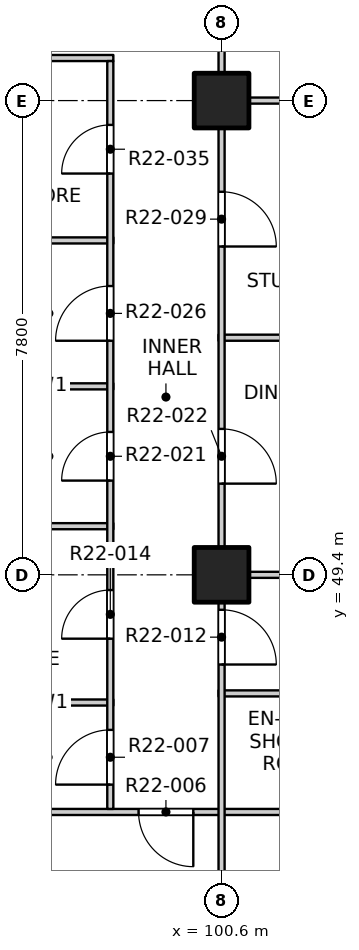
"""IFC4 building model, lengths in metres.
Left out: names, types, materials, properties, quantities, classifications, styles, units other than length and angle.
Written with IfcOpenShell. Run it as: python <this file> out.ifc"""

import sys

from ifc_helpers import new_model, si_unit, direction, frame, frame_2d, origin, origin_2d, place, context, subcontext, project, spatial, rectangle, extrude, element, fill, save


model = new_model("IFC4")
c1 = context("Model", 3, precision=1e-05, world=origin(), true_north=direction((0.0, 1.0)))
c2 = subcontext(c1, "Body", "Model", "MODEL_VIEW")
j1 = project(units=[si_unit("LENGTHUNIT", "METRE"), si_unit("PLANEANGLEUNIT", "RADIAN")], contexts=[c1])
p1 = place(None, origin())
s1 = spatial("IfcSite", under=j1, at=p1, CompositionType="ELEMENT")
p2 = place(p1, origin())
s2 = spatial("IfcBuilding", under=s1, at=p2, CompositionType="ELEMENT")
p3 = place(p2, frame((0.0, 0.0, 231.3)))
s3 = spatial("IfcBuildingStorey", under=s2, at=p3, CompositionType="ELEMENT", Elevation=231.3)
for number, where, z_axis, x_axis in (
    (1, (100.6, 49.4, -0.25), (0.0, 0.0, 1.0), (1.0, 0.0, 0.0)),
    (2, (100.6, 57.2, -0.25), (0.0, 0.0, 1.0), (1.0, 0.0, 0.0)),
):
    element("IfcColumn", number, at=place(p3, frame(where, z_axis=z_axis, x_axis=x_axis)), inside=s3, PredefinedType="COLUMN", context=c2, shape_type="SweptSolid", body=[
        extrude(rectangle(XDim=0.9, YDim=0.9, at=origin_2d()), origin(), (0.0, 0.0, 1.0), 3.4),
    ])
p4 = place(p3, frame((96.625, 45.5, 0.0), z_axis=(0.0, 0.0, 1.0), x_axis=(1.0, 0.0, 0.0)))
e3 = element("IfcWall", 3, at=p4, inside=s3, PredefinedType="PARTITIONING", context=c2, shape_type="SweptSolid", body=[
    extrude(rectangle(XDim=11.475, YDim=0.1, at=frame_2d((5.738, 0.0))), origin(), (0.0, 0.0, 1.0), 3.15),
])
p5 = place(p4, frame((2.61, 0.0, 0.0)))
e4 = element("IfcOpeningElement", 4, at=p5, cuts=e3, PredefinedType="OPENING", context=c2, shape_type="SweptSolid", body=[
    extrude(rectangle(XDim=0.9, YDim=2.1, at=frame_2d((0.45, 1.05))), frame((0.0, 0.06, 0.0), z_axis=(0.0, -1.0, 0.0), x_axis=(1.0, 0.0, 0.0)), (0.0, 0.0, 1.0), 0.12),
])
p6 = place(p3, frame((96.625, 47.3, 0.0), z_axis=(0.0, 0.0, 1.0), x_axis=(1.0, 0.0, 0.0)))
e5 = element("IfcWall", 5, at=p6, inside=s3, PredefinedType="PARTITIONING", context=c2, shape_type="SweptSolid", body=[
    extrude(rectangle(XDim=2.195, YDim=0.1, at=frame_2d((1.098, 0.0))), origin(), (0.0, 0.0, 1.0), 3.15),
])
p7 = place(p3, frame((100.55, 47.45, 0.0), z_axis=(0.0, 0.0, 1.0), x_axis=(1.0, 0.0, 0.0)))
e6 = element("IfcWall", 6, at=p7, inside=s3, PredefinedType="PARTITIONING", context=c2, shape_type="SweptSolid", body=[
    extrude(rectangle(XDim=3.7, YDim=0.1, at=frame_2d((1.85, 0.0))), origin(), (0.0, 0.0, 1.0), 3.15),
])
p8 = place(p3, frame((100.55, 49.4, 0.0), z_axis=(0.0, 0.0, 1.0), x_axis=(1.0, 0.0, 0.0)))
e7 = element("IfcWall", 7, at=p8, inside=s3, PredefinedType="PARTITIONING", context=c2, shape_type="SweptSolid", body=[
    extrude(rectangle(XDim=7.55, YDim=0.1, at=frame_2d((3.775, 0.0))), origin(), (0.0, 0.0, 1.0), 3.15),
])
for number, where, z_axis, x_axis in (
    (8, (96.6, 50.2, 0.0), (0.0, 0.0, 1.0), (1.0, 0.0, 0.0)),
    (9, (96.6, 52.5, 0.0), (0.0, 0.0, 1.0), (1.0, 0.0, 0.0)),
):
    element("IfcWall", number, at=place(p3, frame(where, z_axis=z_axis, x_axis=x_axis)), inside=s3, PredefinedType="PARTITIONING", context=c2, shape_type="SweptSolid", body=[
        extrude(rectangle(XDim=2.22, YDim=0.1, at=frame_2d((1.11, 0.0))), origin(), (0.0, 0.0, 1.0), 3.15),
    ])
p9 = place(p3, frame((100.55, 53.3, 0.0), z_axis=(0.0, 0.0, 1.0), x_axis=(1.0, 0.0, 0.0)))
e10 = element("IfcWall", 10, at=p9, inside=s3, PredefinedType="PARTITIONING", context=c2, shape_type="SweptSolid", body=[
    extrude(rectangle(XDim=7.55, YDim=0.1, at=frame_2d((3.775, 0.0))), origin(), (0.0, 0.0, 1.0), 3.15),
])
p10 = place(p3, frame((96.6, 54.9, 0.0), z_axis=(0.0, 0.0, 1.0), x_axis=(1.0, 0.0, 0.0)))
e11 = element("IfcWall", 11, at=p10, inside=s3, PredefinedType="PARTITIONING", context=c2, shape_type="SweptSolid", body=[
    extrude(rectangle(XDim=2.22, YDim=0.1, at=frame_2d((1.11, 0.0))), origin(), (0.0, 0.0, 1.0), 3.15),
])
p11 = place(p3, frame((100.55, 57.2, 0.0), z_axis=(0.0, 0.0, 1.0), x_axis=(1.0, 0.0, 0.0)))
e12 = element("IfcWall", 12, at=p11, inside=s3, PredefinedType="PARTITIONING", context=c2, shape_type="SweptSolid", body=[
    extrude(rectangle(XDim=7.55, YDim=0.1, at=frame_2d((3.775, 0.0))), origin(), (0.0, 0.0, 1.0), 3.15),
])
p12 = place(p3, frame((96.6, 57.9, 0.0), z_axis=(0.0, 0.0, 1.0), x_axis=(1.0, 0.0, 0.0)))
e13 = element("IfcWall", 13, at=p12, inside=s3, PredefinedType="PARTITIONING", context=c2, shape_type="SweptSolid", body=[
    extrude(rectangle(XDim=2.22, YDim=0.1, at=frame_2d((1.11, 0.0))), origin(), (0.0, 0.0, 1.0), 3.15),
])
p13 = place(p3, frame((98.77, 45.55, 0.0), z_axis=(0.0, 0.0, 1.0), x_axis=(0.0, 1.0, 0.0)))
e14 = element("IfcWall", 14, at=p13, inside=s3, PredefinedType="PARTITIONING", context=c2, shape_type="SweptSolid", body=[
    extrude(rectangle(XDim=12.3, YDim=0.1, at=frame_2d((6.15, 0.0))), origin(), (0.0, 0.0, 1.0), 3.15),
])
p14 = place(p13, frame((0.4, 0.0, 0.0)))
e15 = element("IfcOpeningElement", 15, at=p14, cuts=e14, PredefinedType="OPENING", context=c2, shape_type="SweptSolid", body=[
    extrude(rectangle(XDim=0.9, YDim=2.1, at=frame_2d((0.45, 1.05))), frame((0.0, 0.06, 0.0), z_axis=(0.0, -1.0, 0.0), x_axis=(1.0, 0.0, 0.0)), (0.0, 0.0, 1.0), 0.12),
])
p15 = place(p13, frame((2.8, 0.0, 0.0)))
e16 = element("IfcOpeningElement", 16, at=p15, cuts=e14, PredefinedType="OPENING", context=c2, shape_type="SweptSolid", body=[
    extrude(rectangle(XDim=0.8, YDim=2.1, at=frame_2d((0.4, 1.05))), frame((0.0, 0.06, 0.0), z_axis=(0.0, -1.0, 0.0), x_axis=(1.0, 0.0, 0.0)), (0.0, 0.0, 1.0), 0.12),
])
p16 = place(p13, frame((5.4, 0.0, 0.0)))
e17 = element("IfcOpeningElement", 17, at=p16, cuts=e14, PredefinedType="OPENING", context=c2, shape_type="SweptSolid", body=[
    extrude(rectangle(XDim=0.8, YDim=2.1, at=frame_2d((0.4, 1.05))), frame((0.0, 0.06, 0.0), z_axis=(0.0, -1.0, 0.0), x_axis=(1.0, 0.0, 0.0)), (0.0, 0.0, 1.0), 0.12),
])
p17 = place(p13, frame((7.7, 0.0, 0.0)))
e18 = element("IfcOpeningElement", 18, at=p17, cuts=e14, PredefinedType="OPENING", context=c2, shape_type="SweptSolid", body=[
    extrude(rectangle(XDim=0.9, YDim=2.1, at=frame_2d((0.45, 1.05))), frame((0.0, 0.06, 0.0), z_axis=(0.0, -1.0, 0.0), x_axis=(1.0, 0.0, 0.0)), (0.0, 0.0, 1.0), 0.12),
])
p18 = place(p13, frame((10.45, 0.0, 0.0)))
e19 = element("IfcOpeningElement", 19, at=p18, cuts=e14, PredefinedType="OPENING", context=c2, shape_type="SweptSolid", body=[
    extrude(rectangle(XDim=0.8, YDim=2.1, at=frame_2d((0.4, 1.05))), frame((0.0, 0.06, 0.0), z_axis=(0.0, -1.0, 0.0), x_axis=(1.0, 0.0, 0.0)), (0.0, 0.0, 1.0), 0.12),
])
p19 = place(p3, frame((100.6, 41.9, 0.0), z_axis=(0.0, 0.0, 1.0), x_axis=(0.0, 1.0, 0.0)))
e20 = element("IfcWall", 20, at=p19, inside=s3, PredefinedType="PARTITIONING", context=c2, shape_type="SweptSolid", body=[
    extrude(rectangle(XDim=46.2, YDim=0.1, at=frame_2d((23.1, 0.0))), origin(), (0.0, 0.0, 1.0), 3.15),
])
p20 = place(p19, frame((1.2, 0.0, 0.0)))
e21 = element("IfcOpeningElement", 21, at=p20, cuts=e20, PredefinedType="OPENING", context=c2, shape_type="SweptSolid", body=[
    extrude(rectangle(XDim=0.9, YDim=2.1, at=frame_2d((0.45, 1.05))), frame((0.0, 0.06, 0.0), z_axis=(0.0, -1.0, 0.0), x_axis=(1.0, 0.0, 0.0)), (0.0, 0.0, 1.0), 0.12),
])
p21 = place(p19, frame((6.025, 0.0, 0.0)))
e22 = element("IfcOpeningElement", 22, at=p21, cuts=e20, PredefinedType="OPENING", context=c2, shape_type="SweptSolid", body=[
    extrude(rectangle(XDim=0.9, YDim=2.1, at=frame_2d((0.45, 1.05))), frame((0.0, 0.06, 0.0), z_axis=(0.0, -1.0, 0.0), x_axis=(1.0, 0.0, 0.0)), (0.0, 0.0, 1.0), 0.12),
])
p22 = place(p19, frame((9.0, 0.0, 0.0)))
e23 = element("IfcOpeningElement", 23, at=p22, cuts=e20, PredefinedType="OPENING", context=c2, shape_type="SweptSolid", body=[
    extrude(rectangle(XDim=0.9, YDim=2.1, at=frame_2d((0.45, 1.05))), frame((0.0, 0.06, 0.0), z_axis=(0.0, -1.0, 0.0), x_axis=(1.0, 0.0, 0.0)), (0.0, 0.0, 1.0), 0.12),
])
p23 = place(p19, frame((12.9, 0.0, 0.0)))
e24 = element("IfcOpeningElement", 24, at=p23, cuts=e20, PredefinedType="OPENING", context=c2, shape_type="SweptSolid", body=[
    extrude(rectangle(XDim=0.9, YDim=2.1, at=frame_2d((0.45, 1.05))), frame((0.0, 0.06, 0.0), z_axis=(0.0, -1.0, 0.0), x_axis=(1.0, 0.0, 0.0)), (0.0, 0.0, 1.0), 0.12),
])
p24 = place(p19, frame((17.775, 0.0, 0.0)))
e25 = element("IfcOpeningElement", 25, at=p24, cuts=e20, PredefinedType="OPENING", context=c2, shape_type="SweptSolid", body=[
    extrude(rectangle(XDim=0.9, YDim=2.1, at=frame_2d((0.45, 1.05))), frame((0.0, 0.06, 0.0), z_axis=(0.0, -1.0, 0.0), x_axis=(1.0, 0.0, 0.0)), (0.0, 0.0, 1.0), 0.12),
])
p25 = place(p19, frame((21.625, 0.0, 0.0)))
e26 = element("IfcOpeningElement", 26, at=p25, cuts=e20, PredefinedType="OPENING", context=c2, shape_type="SweptSolid", body=[
    extrude(rectangle(XDim=0.9, YDim=2.1, at=frame_2d((0.45, 1.05))), frame((0.0, 0.06, 0.0), z_axis=(0.0, -1.0, 0.0), x_axis=(1.0, 0.0, 0.0)), (0.0, 0.0, 1.0), 0.12),
])
p26 = place(p19, frame((25.575, 0.0, 0.0)))
e27 = element("IfcOpeningElement", 27, at=p26, cuts=e20, PredefinedType="OPENING", context=c2, shape_type="SweptSolid", body=[
    extrude(rectangle(XDim=0.9, YDim=2.1, at=frame_2d((0.45, 1.05))), frame((0.0, 0.06, 0.0), z_axis=(0.0, -1.0, 0.0), x_axis=(1.0, 0.0, 0.0)), (0.0, 0.0, 1.0), 0.12),
])
p27 = place(p19, frame((28.5, 0.0, 0.0)))
e28 = element("IfcOpeningElement", 28, at=p27, cuts=e20, PredefinedType="OPENING", context=c2, shape_type="SweptSolid", body=[
    extrude(rectangle(XDim=0.9, YDim=2.1, at=frame_2d((0.45, 1.05))), frame((0.0, 0.06, 0.0), z_axis=(0.0, -1.0, 0.0), x_axis=(1.0, 0.0, 0.0)), (0.0, 0.0, 1.0), 0.12),
])
p28 = place(p19, frame((33.375, 0.0, 0.0)))
e29 = element("IfcOpeningElement", 29, at=p28, cuts=e20, PredefinedType="OPENING", context=c2, shape_type="SweptSolid", body=[
    extrude(rectangle(XDim=0.9, YDim=2.1, at=frame_2d((0.45, 1.05))), frame((0.0, 0.06, 0.0), z_axis=(0.0, -1.0, 0.0), x_axis=(1.0, 0.0, 0.0)), (0.0, 0.0, 1.0), 0.12),
])
p29 = place(p19, frame((36.3, 0.0, 0.0)))
e30 = element("IfcOpeningElement", 30, at=p29, cuts=e20, PredefinedType="OPENING", context=c2, shape_type="SweptSolid", body=[
    extrude(rectangle(XDim=0.9, YDim=2.1, at=frame_2d((0.45, 1.05))), frame((0.0, 0.06, 0.0), z_axis=(0.0, -1.0, 0.0), x_axis=(1.0, 0.0, 0.0)), (0.0, 0.0, 1.0), 0.12),
])
p30 = place(p19, frame((40.2, 0.0, 0.0)))
e31 = element("IfcOpeningElement", 31, at=p30, cuts=e20, PredefinedType="OPENING", context=c2, shape_type="SweptSolid", body=[
    extrude(rectangle(XDim=0.9, YDim=2.1, at=frame_2d((0.45, 1.05))), frame((0.0, 0.06, 0.0), z_axis=(0.0, -1.0, 0.0), x_axis=(1.0, 0.0, 0.0)), (0.0, 0.0, 1.0), 0.12),
])
p31 = place(p19, frame((44.1, 0.0, 0.0)))
e32 = element("IfcOpeningElement", 32, at=p31, cuts=e20, PredefinedType="OPENING", context=c2, shape_type="SweptSolid", body=[
    extrude(rectangle(XDim=0.9, YDim=2.1, at=frame_2d((0.45, 1.05))), frame((0.0, 0.06, 0.0), z_axis=(0.0, -1.0, 0.0), x_axis=(1.0, 0.0, 0.0)), (0.0, 0.0, 1.0), 0.12),
])
p32 = place(p5, origin())
e33 = element("IfcDoor", 33, at=p32, inside=s3, OperationType="SINGLE_SWING_LEFT", PredefinedType="DOOR", context=c2, shape_type="SweptSolid", body=[
    extrude(rectangle(XDim=0.9, YDim=2.1, at=frame_2d((0.45, 1.05))), frame((0.0, 0.025, 0.0), z_axis=(0.0, -1.0, 0.0), x_axis=(1.0, 0.0, 0.0)), (0.0, 0.0, 1.0), 0.05),
])
fill(e4, e33)
p33 = place(p14, origin())
e34 = element("IfcDoor", 34, at=p33, inside=s3, OperationType="SINGLE_SWING_LEFT", PredefinedType="DOOR", context=c2, shape_type="SweptSolid", body=[
    extrude(rectangle(XDim=0.9, YDim=2.1, at=frame_2d((0.45, 1.05))), frame((0.0, 0.025, 0.0), z_axis=(0.0, -1.0, 0.0), x_axis=(1.0, 0.0, 0.0)), (0.0, 0.0, 1.0), 0.05),
])
fill(e15, e34)
p34 = place(p21, origin())
e35 = element("IfcDoor", 35, at=p34, inside=s3, OperationType="SINGLE_SWING_RIGHT", PredefinedType="DOOR", context=c2, shape_type="SweptSolid", body=[
    extrude(rectangle(XDim=0.9, YDim=2.1, at=frame_2d((0.45, 1.05))), frame((0.0, 0.025, 0.0), z_axis=(0.0, -1.0, 0.0), x_axis=(1.0, 0.0, 0.0)), (0.0, 0.0, 1.0), 0.05),
])
fill(e22, e35)
p35 = place(p15, origin())
e36 = element("IfcDoor", 36, at=p35, inside=s3, OperationType="SINGLE_SWING_LEFT", PredefinedType="DOOR", context=c2, shape_type="SweptSolid", body=[
    extrude(rectangle(XDim=0.8, YDim=2.1, at=frame_2d((0.4, 1.05))), frame((0.0, 0.025, 0.0), z_axis=(0.0, -1.0, 0.0), x_axis=(1.0, 0.0, 0.0)), (0.0, 0.0, 1.0), 0.05),
])
fill(e16, e36)
p36 = place(p16, origin())
e37 = element("IfcDoor", 37, at=p36, inside=s3, OperationType="SINGLE_SWING_LEFT", PredefinedType="DOOR", context=c2, shape_type="SweptSolid", body=[
    extrude(rectangle(XDim=0.8, YDim=2.1, at=frame_2d((0.4, 1.05))), frame((0.0, 0.025, 0.0), z_axis=(0.0, -1.0, 0.0), x_axis=(1.0, 0.0, 0.0)), (0.0, 0.0, 1.0), 0.05),
])
fill(e17, e37)
p37 = place(p22, origin())
e38 = element("IfcDoor", 38, at=p37, inside=s3, OperationType="SINGLE_SWING_RIGHT", PredefinedType="DOOR", context=c2, shape_type="SweptSolid", body=[
    extrude(rectangle(XDim=0.9, YDim=2.1, at=frame_2d((0.45, 1.05))), frame((0.0, 0.025, 0.0), z_axis=(0.0, -1.0, 0.0), x_axis=(1.0, 0.0, 0.0)), (0.0, 0.0, 1.0), 0.05),
])
fill(e23, e38)
p38 = place(p17, origin())
e39 = element("IfcDoor", 39, at=p38, inside=s3, OperationType="SINGLE_SWING_LEFT", PredefinedType="DOOR", context=c2, shape_type="SweptSolid", body=[
    extrude(rectangle(XDim=0.9, YDim=2.1, at=frame_2d((0.45, 1.05))), frame((0.0, 0.025, 0.0), z_axis=(0.0, -1.0, 0.0), x_axis=(1.0, 0.0, 0.0)), (0.0, 0.0, 1.0), 0.05),
])
fill(e18, e39)
p39 = place(p23, origin())
e40 = element("IfcDoor", 40, at=p39, inside=s3, OperationType="SINGLE_SWING_RIGHT", PredefinedType="DOOR", context=c2, shape_type="SweptSolid", body=[
    extrude(rectangle(XDim=0.9, YDim=2.1, at=frame_2d((0.45, 1.05))), frame((0.0, 0.025, 0.0), z_axis=(0.0, -1.0, 0.0), x_axis=(1.0, 0.0, 0.0)), (0.0, 0.0, 1.0), 0.05),
])
fill(e24, e40)
p40 = place(p18, origin())
e41 = element("IfcDoor", 41, at=p40, inside=s3, OperationType="SINGLE_SWING_LEFT", PredefinedType="DOOR", context=c2, shape_type="SweptSolid", body=[
    extrude(rectangle(XDim=0.8, YDim=2.1, at=frame_2d((0.4, 1.05))), frame((0.0, 0.025, 0.0), z_axis=(0.0, -1.0, 0.0), x_axis=(1.0, 0.0, 0.0)), (0.0, 0.0, 1.0), 0.05),
])
fill(e19, e41)
save(model, sys.argv[1])
